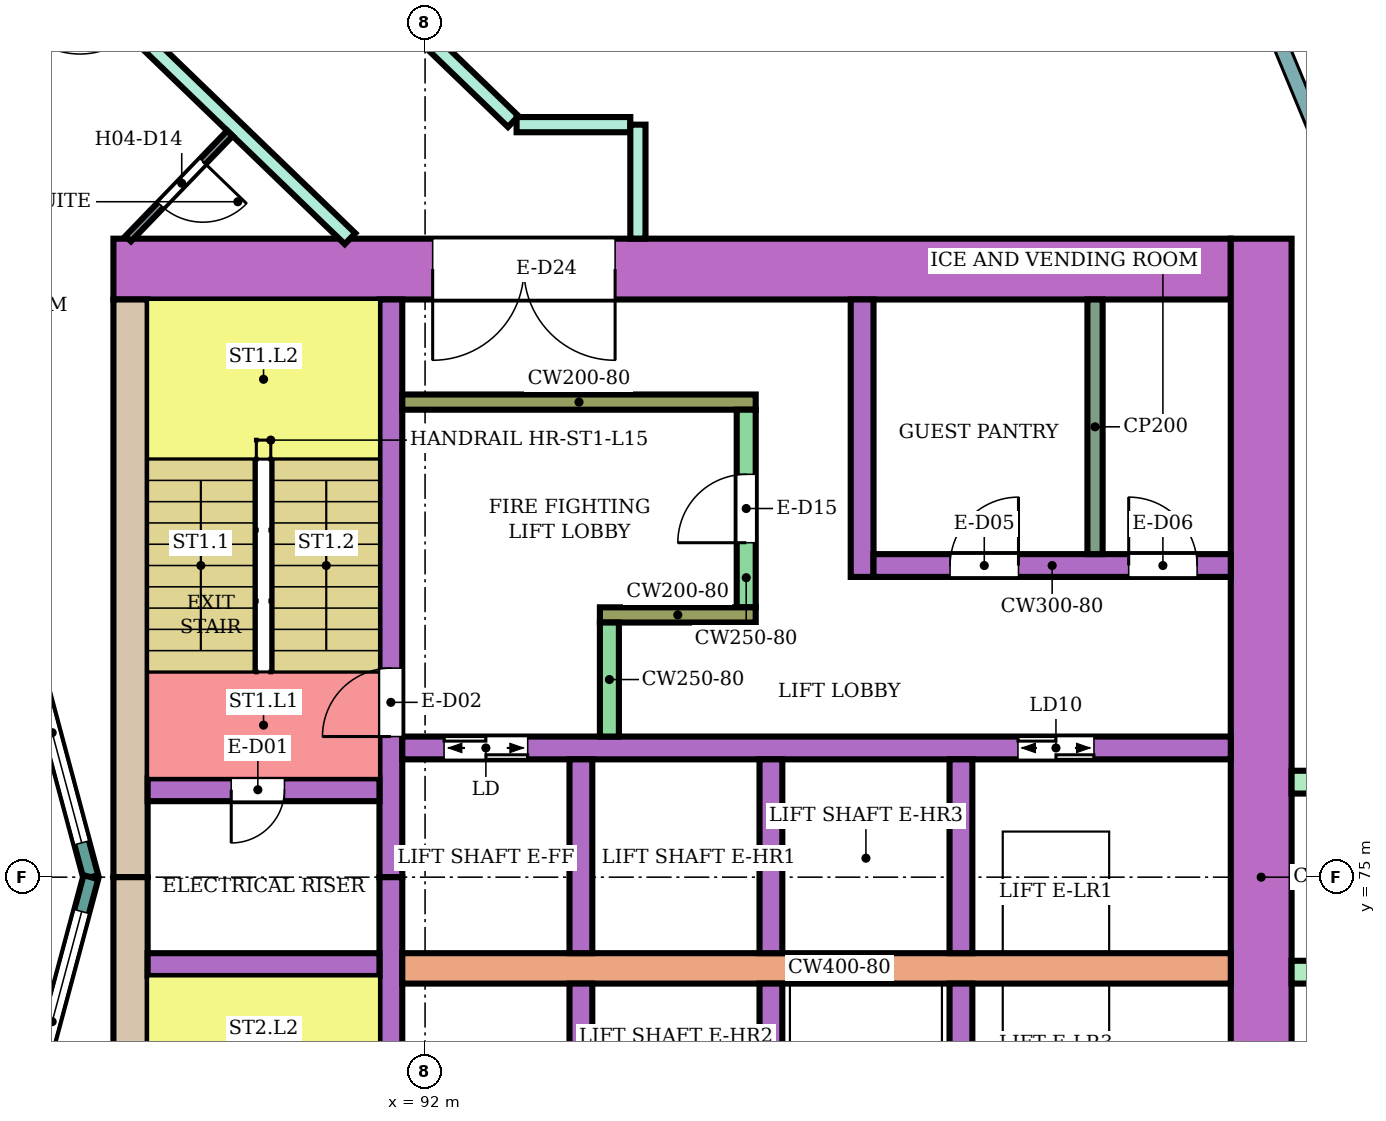
"""IFC4 building model, lengths in metres.
Left out: names, types, materials, properties, quantities, classifications, styles, units other than length and angle.
Written with IfcOpenShell. Run it as: python <this file> out.ifc"""

import sys

from ifc_helpers import new_model, si_unit, direction, frame, frame_2d, origin, place, context, subcontext, project, spatial, rectangle, extrude, element, fill, save


model = new_model("IFC4")
c1 = context("Model", 3, precision=1e-05, world=origin(), true_north=direction((0.0, 1.0)))
c2 = subcontext(c1, "Body", "Model", "MODEL_VIEW")
j1 = project(units=[si_unit("LENGTHUNIT", "METRE"), si_unit("PLANEANGLEUNIT", "RADIAN")], contexts=[c1])
p1 = place(None, origin())
s1 = spatial("IfcSite", under=j1, at=p1, CompositionType="ELEMENT")
p2 = place(p1, origin())
s2 = spatial("IfcBuilding", under=s1, at=p2, CompositionType="ELEMENT")
p3 = place(p2, frame((0.0, 0.0, 66.8)))
s3 = spatial("IfcBuildingStorey", under=s2, at=p3, CompositionType="ELEMENT", Elevation=66.8)
p4 = place(p3, frame((87.9, 83.0, 0.0), z_axis=(0.0, 0.0, 1.0), x_axis=(1.0, 0.0, 0.0)))
e1 = element("IfcWall", 1, at=p4, inside=s3, PredefinedType="SHEAR", context=c2, shape_type="SweptSolid", body=[
    extrude(rectangle(XDim=14.7, YDim=0.8, at=frame_2d((7.35, 0.0))), origin(), (0.0, 0.0, 1.0), 3.48),
])
p5 = place(p4, frame((4.2, 0.0, 0.0)))
e2 = element("IfcOpeningElement", 2, at=p5, cuts=e1, PredefinedType="OPENING", context=c2, shape_type="SweptSolid", body=[
    extrude(rectangle(XDim=2.4, YDim=2.4, at=frame_2d((1.2, 1.2))), frame((0.0, 0.41, 0.0), z_axis=(0.0, -1.0, 0.0), x_axis=(1.0, 0.0, 0.0)), (0.0, 0.0, 1.0), 0.82),
])
for number, where, z_axis, x_axis in (
    (3, (88.125, 75.0, 0.0), (0.0, 0.0, 1.0), (0.0, 1.0, 0.0)),
    (4, (88.125, 67.4, 0.0), (0.0, 0.0, 1.0), (0.0, 1.0, 0.0)),
):
    element("IfcWall", number, at=place(p3, frame(where, z_axis=z_axis, x_axis=x_axis)), inside=s3, PredefinedType="SHEAR", context=c2, shape_type="SweptSolid", body=[
        extrude(rectangle(XDim=7.6, YDim=0.45, at=frame_2d((3.8, 0.0))), origin(), (0.0, 0.0, 1.0), 3.48),
    ])
p6 = place(p3, frame((103.0, 66.6, 0.0), z_axis=(0.0, 0.0, 1.0), x_axis=(0.0, 1.0, 0.0)))
e5 = element("IfcWall", 5, at=p6, inside=s3, PredefinedType="SHEAR", context=c2, shape_type="SweptSolid", body=[
    extrude(rectangle(XDim=16.8, YDim=0.8, at=frame_2d((8.4, 0.0))), origin(), (0.0, 0.0, 1.0), 3.48),
])
p7 = place(p3, frame((91.55, 75.0, 0.0), z_axis=(0.0, 0.0, 1.0), x_axis=(0.0, 1.0, 0.0)))
e6 = element("IfcWall", 6, at=p7, inside=s3, PredefinedType="SHEAR", context=c2, shape_type="SweptSolid", body=[
    extrude(rectangle(XDim=7.6, YDim=0.3, at=frame_2d((3.8, 0.0))), origin(), (0.0, 0.0, 1.0), 3.48),
])
p8 = place(p7, frame((1.85, 0.0, 0.0)))
e7 = element("IfcOpeningElement", 7, at=p8, cuts=e6, PredefinedType="OPENING", context=c2, shape_type="SweptSolid", body=[
    extrude(rectangle(XDim=0.9, YDim=2.1, at=frame_2d((0.45, 1.05))), frame((0.0, 0.16, 0.0), z_axis=(0.0, -1.0, 0.0), x_axis=(1.0, 0.0, 0.0)), (0.0, 0.0, 1.0), 0.32),
])
p9 = place(p3, frame((91.55, 67.4, 0.0), z_axis=(0.0, 0.0, 1.0), x_axis=(0.0, 1.0, 0.0)))
e8 = element("IfcWall", 8, at=p9, inside=s3, PredefinedType="SHEAR", context=c2, shape_type="SweptSolid", body=[
    extrude(rectangle(XDim=7.6, YDim=0.3, at=frame_2d((3.8, 0.0))), origin(), (0.0, 0.0, 1.0), 3.48),
])
p10 = place(p9, frame((0.25, 0.0, 0.0)))
e9 = element("IfcOpeningElement", 9, at=p10, cuts=e8, PredefinedType="OPENING", context=c2, shape_type="SweptSolid", body=[
    extrude(rectangle(XDim=0.9, YDim=2.1, at=frame_2d((0.45, 1.05))), frame((0.0, 0.16, 0.0), z_axis=(0.0, -1.0, 0.0), x_axis=(1.0, 0.0, 0.0)), (0.0, 0.0, 1.0), 0.32),
])
p11 = place(p3, frame((88.35, 76.15, 0.0), z_axis=(0.0, 0.0, 1.0), x_axis=(1.0, 0.0, 0.0)))
e10 = element("IfcWall", 10, at=p11, inside=s3, PredefinedType="SHEAR", context=c2, shape_type="SweptSolid", body=[
    extrude(rectangle(XDim=3.05, YDim=0.3, at=frame_2d((1.525, 0.0))), origin(), (0.0, 0.0, 1.0), 3.48),
])
p12 = place(p11, frame((1.1, 0.0, 0.0)))
e11 = element("IfcOpeningElement", 11, at=p12, cuts=e10, PredefinedType="OPENING", context=c2, shape_type="SweptSolid", body=[
    extrude(rectangle(XDim=0.7, YDim=2.0, at=frame_2d((0.35, 1.0))), frame((0.0, 0.16, 0.0), z_axis=(0.0, -1.0, 0.0), x_axis=(1.0, 0.0, 0.0)), (0.0, 0.0, 1.0), 0.32),
])
p13 = place(p3, frame((88.35, 73.85, 0.0), z_axis=(0.0, 0.0, 1.0), x_axis=(1.0, 0.0, 0.0)))
e12 = element("IfcWall", 12, at=p13, inside=s3, PredefinedType="SHEAR", context=c2, shape_type="SweptSolid", body=[
    extrude(rectangle(XDim=3.05, YDim=0.3, at=frame_2d((1.525, 0.0))), origin(), (0.0, 0.0, 1.0), 3.48),
])
p14 = place(p3, frame((91.7, 76.7, 0.0), z_axis=(0.0, 0.0, 1.0), x_axis=(1.0, 0.0, 0.0)))
e13 = element("IfcWall", 13, at=p14, inside=s3, PredefinedType="SHEAR", context=c2, shape_type="SweptSolid", body=[
    extrude(rectangle(XDim=10.9, YDim=0.3, at=frame_2d((5.45, 0.0))), origin(), (0.0, 0.0, 1.0), 3.48),
])
p15 = place(p14, frame((0.55, 0.0, 0.0)))
e14 = element("IfcOpeningElement", 14, at=p15, cuts=e13, PredefinedType="OPENING", context=c2, shape_type="SweptSolid", body=[
    extrude(rectangle(XDim=1.1, YDim=2.1, at=frame_2d((0.55, 1.05))), frame((0.0, 0.16, 0.0), z_axis=(0.0, -1.0, 0.0), x_axis=(1.0, 0.0, 0.0)), (0.0, 0.0, 1.0), 0.32),
])
p16 = place(p14, frame((8.1, 0.0, 0.0)))
e15 = element("IfcOpeningElement", 15, at=p16, cuts=e13, PredefinedType="OPENING", context=c2, shape_type="SweptSolid", body=[
    extrude(rectangle(XDim=1.0, YDim=2.1, at=frame_2d((0.5, 1.05))), frame((0.0, 0.16, 0.0), z_axis=(0.0, -1.0, 0.0), x_axis=(1.0, 0.0, 0.0)), (0.0, 0.0, 1.0), 0.32),
])
p17 = place(p3, frame((91.7, 73.8, 0.0), z_axis=(0.0, 0.0, 1.0), x_axis=(1.0, 0.0, 0.0)))
e16 = element("IfcWall", 16, at=p17, inside=s3, PredefinedType="SHEAR", context=c2, shape_type="SweptSolid", body=[
    extrude(rectangle(XDim=10.9, YDim=0.4, at=frame_2d((5.45, 0.0))), origin(), (0.0, 0.0, 1.0), 3.48),
])
for number, where, z_axis, x_axis in (
    (17, (94.05, 74.0, 0.0), (0.0, 0.0, 1.0), (0.0, 1.0, 0.0)),
    (18, (96.55, 74.0, 0.0), (0.0, 0.0, 1.0), (0.0, 1.0, 0.0)),
    (19, (99.05, 74.0, 0.0), (0.0, 0.0, 1.0), (0.0, 1.0, 0.0)),
    (20, (94.05, 71.05, 0.0), (0.0, 0.0, 1.0), (0.0, 1.0, 0.0)),
    (21, (96.55, 71.05, 0.0), (0.0, 0.0, 1.0), (0.0, 1.0, 0.0)),
    (22, (99.05, 71.05, 0.0), (0.0, 0.0, 1.0), (0.0, 1.0, 0.0)),
):
    element("IfcWall", number, at=place(p3, frame(where, z_axis=z_axis, x_axis=x_axis)), inside=s3, PredefinedType="SHEAR", context=c2, shape_type="SweptSolid", body=[
        extrude(rectangle(XDim=2.55, YDim=0.3, at=frame_2d((1.275, 0.0))), origin(), (0.0, 0.0, 1.0), 3.48),
    ])
p18 = place(p3, frame((91.7, 81.25, 0.0), z_axis=(0.0, 0.0, 1.0), x_axis=(1.0, 0.0, 0.0)))
e23 = element("IfcWall", 23, at=p18, inside=s3, PredefinedType="SHEAR", context=c2, shape_type="SweptSolid", body=[
    extrude(rectangle(XDim=4.65, YDim=0.2, at=frame_2d((2.325, 0.0))), origin(), (0.0, 0.0, 1.0), 3.48),
])
p19 = place(p3, frame((96.225, 78.55, 0.0), z_axis=(0.0, 0.0, 1.0), x_axis=(0.0, 1.0, 0.0)))
e24 = element("IfcWall", 24, at=p19, inside=s3, PredefinedType="SHEAR", context=c2, shape_type="SweptSolid", body=[
    extrude(rectangle(XDim=2.6, YDim=0.25, at=frame_2d((1.3, 0.0))), origin(), (0.0, 0.0, 1.0), 3.48),
])
p20 = place(p19, frame((0.85, 0.0, 0.0)))
e25 = element("IfcOpeningElement", 25, at=p20, cuts=e24, PredefinedType="OPENING", context=c2, shape_type="SweptSolid", body=[
    extrude(rectangle(XDim=0.9, YDim=2.1, at=frame_2d((0.45, 1.05))), frame((0.0, 0.135, 0.0), z_axis=(0.0, -1.0, 0.0), x_axis=(1.0, 0.0, 0.0)), (0.0, 0.0, 1.0), 0.27),
])
p21 = place(p3, frame((94.3, 78.45, 0.0), z_axis=(0.0, 0.0, 1.0), x_axis=(1.0, 0.0, 0.0)))
e26 = element("IfcWall", 26, at=p21, inside=s3, PredefinedType="SHEAR", context=c2, shape_type="SweptSolid", body=[
    extrude(rectangle(XDim=2.05, YDim=0.2, at=frame_2d((1.025, 0.0))), origin(), (0.0, 0.0, 1.0), 3.48),
])
p22 = place(p3, frame((94.425, 76.85, 0.0), z_axis=(0.0, 0.0, 1.0), x_axis=(0.0, 1.0, 0.0)))
e27 = element("IfcWall", 27, at=p22, inside=s3, PredefinedType="SHEAR", context=c2, shape_type="SweptSolid", body=[
    extrude(rectangle(XDim=1.5, YDim=0.25, at=frame_2d((0.75, 0.0))), origin(), (0.0, 0.0, 1.0), 3.48),
])
p23 = place(p3, frame((97.75, 78.95, 0.0), z_axis=(0.0, 0.0, 1.0), x_axis=(0.0, 1.0, 0.0)))
e28 = element("IfcWall", 28, at=p23, inside=s3, PredefinedType="SHEAR", context=c2, shape_type="SweptSolid", body=[
    extrude(rectangle(XDim=3.65, YDim=0.3, at=frame_2d((1.825, 0.0))), origin(), (0.0, 0.0, 1.0), 3.48),
])
p24 = place(p3, frame((97.9, 79.1, 0.0), z_axis=(0.0, 0.0, 1.0), x_axis=(1.0, 0.0, 0.0)))
e29 = element("IfcWall", 29, at=p24, inside=s3, PredefinedType="SHEAR", context=c2, shape_type="SweptSolid", body=[
    extrude(rectangle(XDim=4.7, YDim=0.3, at=frame_2d((2.35, 0.0))), origin(), (0.0, 0.0, 1.0), 3.48),
])
p25 = place(p24, frame((1.007, 0.0, 0.0)))
e30 = element("IfcOpeningElement", 30, at=p25, cuts=e29, PredefinedType="OPENING", context=c2, shape_type="SweptSolid", body=[
    extrude(rectangle(XDim=0.9, YDim=2.1, at=frame_2d((0.45, 1.05))), frame((0.0, 0.16, 0.0), z_axis=(0.0, -1.0, 0.0), x_axis=(1.0, 0.0, 0.0)), (0.0, 0.0, 1.0), 0.32),
])
p26 = place(p24, frame((3.357, 0.0, 0.0)))
e31 = element("IfcOpeningElement", 31, at=p26, cuts=e29, PredefinedType="OPENING", context=c2, shape_type="SweptSolid", body=[
    extrude(rectangle(XDim=0.9, YDim=2.1, at=frame_2d((0.45, 1.05))), frame((0.0, 0.16, 0.0), z_axis=(0.0, -1.0, 0.0), x_axis=(1.0, 0.0, 0.0)), (0.0, 0.0, 1.0), 0.32),
])
for number, where, z_axis, x_axis in (
    (32, (103.4, 73.75, 0.0), (0.0, 0.0, 1.0), (1.0, 0.0, 0.0)),
    (33, (103.4, 76.25, 0.0), (0.0, 0.0, 1.0), (1.0, 0.0, 0.0)),
):
    element("IfcWall", number, at=place(p3, frame(where, z_axis=z_axis, x_axis=x_axis)), inside=s3, PredefinedType="NOTDEFINED", context=c2, shape_type="SweptSolid", body=[
        extrude(rectangle(XDim=2.416, YDim=0.3, at=frame_2d((1.208, 0.0))), origin(), (0.0, 0.0, 1.0), 3.8),
    ])
p27 = place(p3, frame((87.604, 75.0, 0.0), z_axis=(0.0, 0.0, 1.0), x_axis=(-0.258789828301, 0.965933654434, 0.0)))
e34 = element("IfcWall", 34, at=p27, inside=s3, PredefinedType="NOTDEFINED", context=c2, shape_type="SweptSolid", body=[
    extrude(rectangle(XDim=3.936, YDim=0.2, at=frame_2d((1.968, 0.0))), origin(), (0.0, 0.0, 1.0), 3.8),
])
p28 = place(p27, frame((0.468, 0.0, 0.9)))
e35 = element("IfcOpeningElement", 35, at=p28, cuts=e34, PredefinedType="OPENING", context=c2, shape_type="SweptSolid", body=[
    extrude(rectangle(XDim=3.0, YDim=2.3, at=frame_2d((1.5, 1.15))), frame((0.0, 0.11, 0.0), z_axis=(0.0, -1.0, 0.0), x_axis=(1.0, 0.0, 0.0)), (0.0, 0.0, 1.0), 0.22),
])
p29 = place(p3, frame((86.585, 71.198, 0.0), z_axis=(0.0, 0.0, 1.0), x_axis=(0.258789828301, 0.965933654434, 0.0)))
e36 = element("IfcWall", 36, at=p29, inside=s3, PredefinedType="NOTDEFINED", context=c2, shape_type="SweptSolid", body=[
    extrude(rectangle(XDim=3.936, YDim=0.2, at=frame_2d((1.968, 0.0))), origin(), (0.0, 0.0, 1.0), 3.8),
])
p30 = place(p29, frame((0.468, 0.0, 0.9)))
e37 = element("IfcOpeningElement", 37, at=p30, cuts=e36, PredefinedType="OPENING", context=c2, shape_type="SweptSolid", body=[
    extrude(rectangle(XDim=3.0, YDim=2.3, at=frame_2d((1.5, 1.15))), frame((0.0, 0.11, 0.0), z_axis=(0.0, -1.0, 0.0), x_axis=(1.0, 0.0, 0.0)), (0.0, 0.0, 1.0), 0.22),
])
p31 = place(p3, frame((87.064, 87.211, 0.0), z_axis=(0.0, 0.0, 1.0), x_axis=(0.719540958932, -0.694450004262, 0.0)))
e38 = element("IfcWall", 38, at=p31, inside=s3, PredefinedType="PARTITIONING", context=c2, shape_type="SweptSolid", body=[
    extrude(rectangle(XDim=5.488, YDim=0.2, at=frame_2d((2.744, 0.0))), origin(), (0.0, 0.0, 1.0), 3.35),
])
p32 = place(p31, frame((0.55, 0.0, 0.0)))
e39 = element("IfcOpeningElement", 39, at=p32, cuts=e38, PredefinedType="OPENING", context=c2, shape_type="SweptSolid", body=[
    extrude(rectangle(XDim=1.0, YDim=2.1, at=frame_2d((0.5, 1.05))), frame((0.0, 0.11, 0.0), z_axis=(0.0, -1.0, 0.0), x_axis=(1.0, 0.0, 0.0)), (0.0, 0.0, 1.0), 0.22),
])
p33 = place(p3, frame((88.386, 89.549, 0.0), z_axis=(0.0, 0.0, 1.0), x_axis=(0.719560576741, -0.694429677073, 0.0)))
e40 = element("IfcWall", 40, at=p33, inside=s3, PredefinedType="PARTITIONING", context=c2, shape_type="SweptSolid", body=[
    extrude(rectangle(XDim=6.635, YDim=0.2, at=frame_2d((3.318, 0.0))), origin(), (0.0, 0.0, 1.0), 3.35),
])
p34 = place(p33, frame((2.147, 0.0, 0.0)))
e41 = element("IfcOpeningElement", 41, at=p34, cuts=e40, PredefinedType="OPENING", context=c2, shape_type="SweptSolid", body=[
    extrude(rectangle(XDim=1.8, YDim=2.1, at=frame_2d((0.9, 1.05))), frame((0.0, 0.11, 0.0), z_axis=(0.0, -1.0, 0.0), x_axis=(1.0, 0.0, 0.0)), (0.0, 0.0, 1.0), 0.22),
])
p35 = place(p3, frame((93.204, 84.9, 0.0), z_axis=(0.0, 0.0, 1.0), x_axis=(1.0, 0.0, 0.0)))
e42 = element("IfcWall", 42, at=p35, inside=s3, PredefinedType="PARTITIONING", context=c2, shape_type="SweptSolid", body=[
    extrude(rectangle(XDim=1.496, YDim=0.2, at=frame_2d((0.748, 0.0))), origin(), (0.0, 0.0, 1.0), 3.35),
])
p36 = place(p3, frame((94.8, 83.401, 0.0), z_axis=(0.0, 0.0, 1.0), x_axis=(0.0, 1.0, 0.0)))
e43 = element("IfcWall", 43, at=p36, inside=s3, PredefinedType="PARTITIONING", context=c2, shape_type="SweptSolid", body=[
    extrude(rectangle(XDim=1.499, YDim=0.2, at=frame_2d((0.75, 0.0))), origin(), (0.0, 0.0, 1.0), 3.35),
])
p37 = place(p3, frame((88.095, 83.4, 0.0), z_axis=(0.0, 0.0, 1.0), x_axis=(0.694447472534, 0.719543402368, 0.0)))
e44 = element("IfcWall", 44, at=p37, inside=s3, PredefinedType="PARTITIONING", context=c2, shape_type="SweptSolid", body=[
    extrude(rectangle(XDim=1.926, YDim=0.1, at=frame_2d((0.963, 0.0))), origin(), (0.0, 0.0, 1.0), 3.35),
])
p38 = place(p37, frame((0.613, 0.0, 0.0)))
e45 = element("IfcOpeningElement", 45, at=p38, cuts=e44, PredefinedType="OPENING", context=c2, shape_type="SweptSolid", body=[
    extrude(rectangle(XDim=0.8, YDim=2.1, at=frame_2d((0.4, 1.05))), frame((0.0, 0.06, 0.0), z_axis=(0.0, -1.0, 0.0), x_axis=(1.0, 0.0, 0.0)), (0.0, 0.0, 1.0), 0.12),
])
p39 = place(p3, frame((100.814, 79.25, 0.0), z_axis=(0.0, 0.0, 1.0), x_axis=(0.0, 1.0, 0.0)))
e46 = element("IfcWall", 46, at=p39, inside=s3, PredefinedType="PARTITIONING", context=c2, shape_type="SweptSolid", body=[
    extrude(rectangle(XDim=3.35, YDim=0.2, at=frame_2d((1.675, 0.0))), origin(), (0.0, 0.0, 1.0), 3.48),
])
p40 = place(p28, origin())
e47 = element("IfcWindow", 47, at=p40, inside=s3, PartitioningType="SINGLE_PANEL", PredefinedType="WINDOW", context=c2, shape_type="SweptSolid", body=[
    extrude(rectangle(XDim=3.0, YDim=2.3, at=frame_2d((1.5, 1.15))), frame((0.0, 0.03, 0.0), z_axis=(0.0, -1.0, 0.0), x_axis=(1.0, 0.0, 0.0)), (0.0, 0.0, 1.0), 0.06),
])
fill(e35, e47)
p41 = place(p30, origin())
e48 = element("IfcWindow", 48, at=p41, inside=s3, PartitioningType="SINGLE_PANEL", PredefinedType="WINDOW", context=c2, shape_type="SweptSolid", body=[
    extrude(rectangle(XDim=3.0, YDim=2.3, at=frame_2d((1.5, 1.15))), frame((0.0, 0.03, 0.0), z_axis=(0.0, -1.0, 0.0), x_axis=(1.0, 0.0, 0.0)), (0.0, 0.0, 1.0), 0.06),
])
fill(e37, e48)
p42 = place(p38, frame((0.8, 0.0, 0.0), z_axis=(0.0, 0.0, 1.0), x_axis=(-1.0, 0.0, 0.0)))
e49 = element("IfcDoor", 49, at=p42, inside=s3, OperationType="SINGLE_SWING_LEFT", PredefinedType="DOOR", context=c2, shape_type="SweptSolid", body=[
    extrude(rectangle(XDim=0.8, YDim=2.1, at=frame_2d((0.4, 1.05))), frame((0.0, 0.025, 0.0), z_axis=(0.0, -1.0, 0.0), x_axis=(1.0, 0.0, 0.0)), (0.0, 0.0, 1.0), 0.05),
])
fill(e45, e49)
p43 = place(p12, frame((0.7, 0.0, 0.0), z_axis=(0.0, 0.0, 1.0), x_axis=(-1.0, 0.0, 0.0)))
e50 = element("IfcDoor", 50, at=p43, inside=s3, OperationType="SINGLE_SWING_RIGHT", PredefinedType="DOOR", context=c2, shape_type="SweptSolid", body=[
    extrude(rectangle(XDim=0.7, YDim=2.0, at=frame_2d((0.35, 1.0))), frame((0.0, 0.025, 0.0), z_axis=(0.0, -1.0, 0.0), x_axis=(1.0, 0.0, 0.0)), (0.0, 0.0, 1.0), 0.05),
])
fill(e11, e50)
p44 = place(p8, origin())
e51 = element("IfcDoor", 51, at=p44, inside=s3, OperationType="SINGLE_SWING_LEFT", PredefinedType="DOOR", context=c2, shape_type="SweptSolid", body=[
    extrude(rectangle(XDim=0.9, YDim=2.1, at=frame_2d((0.45, 1.05))), frame((0.0, 0.025, 0.0), z_axis=(0.0, -1.0, 0.0), x_axis=(1.0, 0.0, 0.0)), (0.0, 0.0, 1.0), 0.05),
])
fill(e7, e51)
p45 = place(p15, origin())
e52 = element("IfcDoor", 52, at=p45, inside=s3, OperationType="DOUBLE_DOOR_SLIDING", PredefinedType="DOOR", context=c2, shape_type="SweptSolid", body=[
    extrude(rectangle(XDim=1.1, YDim=2.1, at=frame_2d((0.55, 1.05))), frame((0.0, 0.025, 0.0), z_axis=(0.0, -1.0, 0.0), x_axis=(1.0, 0.0, 0.0)), (0.0, 0.0, 1.0), 0.05),
])
fill(e14, e52)
p46 = place(p16, origin())
e53 = element("IfcDoor", 53, at=p46, inside=s3, OperationType="DOUBLE_DOOR_SLIDING", PredefinedType="DOOR", context=c2, shape_type="SweptSolid", body=[
    extrude(rectangle(XDim=1.0, YDim=2.1, at=frame_2d((0.5, 1.05))), frame((0.0, 0.025, 0.0), z_axis=(0.0, -1.0, 0.0), x_axis=(1.0, 0.0, 0.0)), (0.0, 0.0, 1.0), 0.05),
])
fill(e15, e53)
p47 = place(p20, origin())
e54 = element("IfcDoor", 54, at=p47, inside=s3, OperationType="SINGLE_SWING_LEFT", PredefinedType="DOOR", context=c2, shape_type="SweptSolid", body=[
    extrude(rectangle(XDim=0.9, YDim=2.1, at=frame_2d((0.45, 1.05))), frame((0.0, 0.025, 0.0), z_axis=(0.0, -1.0, 0.0), x_axis=(1.0, 0.0, 0.0)), (0.0, 0.0, 1.0), 0.05),
])
fill(e25, e54)
p48 = place(p25, origin())
e55 = element("IfcDoor", 55, at=p48, inside=s3, OperationType="SINGLE_SWING_RIGHT", PredefinedType="DOOR", context=c2, shape_type="SweptSolid", body=[
    extrude(rectangle(XDim=0.9, YDim=2.1, at=frame_2d((0.45, 1.05))), frame((0.0, 0.025, 0.0), z_axis=(0.0, -1.0, 0.0), x_axis=(1.0, 0.0, 0.0)), (0.0, 0.0, 1.0), 0.05),
])
fill(e30, e55)
p49 = place(p26, origin())
e56 = element("IfcDoor", 56, at=p49, inside=s3, OperationType="SINGLE_SWING_LEFT", PredefinedType="DOOR", context=c2, shape_type="SweptSolid", body=[
    extrude(rectangle(XDim=0.9, YDim=2.1, at=frame_2d((0.45, 1.05))), frame((0.0, 0.025, 0.0), z_axis=(0.0, -1.0, 0.0), x_axis=(1.0, 0.0, 0.0)), (0.0, 0.0, 1.0), 0.05),
])
fill(e31, e56)
p50 = place(p5, frame((2.4, 0.0, 0.0), z_axis=(0.0, 0.0, 1.0), x_axis=(-1.0, 0.0, 0.0)))
e57 = element("IfcDoor", 57, at=p50, inside=s3, OperationType="DOUBLE_DOOR_SINGLE_SWING", PredefinedType="DOOR", context=c2, shape_type="SweptSolid", body=[
    extrude(rectangle(XDim=2.4, YDim=2.4, at=frame_2d((1.2, 1.2))), frame((0.0, 0.025, 0.0), z_axis=(0.0, -1.0, 0.0), x_axis=(1.0, 0.0, 0.0)), (0.0, 0.0, 1.0), 0.05),
])
fill(e2, e57)
save(model, sys.argv[1])
